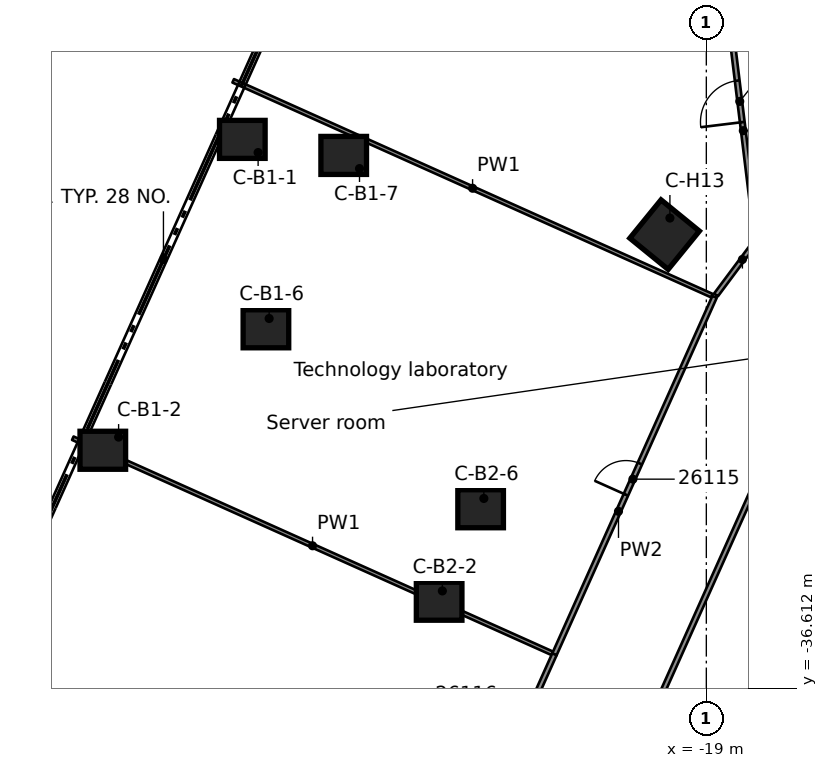
"""IFC4 building model, lengths in metres.
Left out: names, types, materials, properties, quantities, classifications, styles, units other than length and angle.
Written with IfcOpenShell. Run it as: python <this file> out.ifc"""

import sys

from ifc_helpers import new_model, si_unit, direction, frame, frame_2d, origin, origin_2d, place, context, subcontext, project, spatial, rectangle, extrude, element, fill, save


model = new_model("IFC4")
c1 = context("Model", 3, precision=1e-05, world=origin(), true_north=direction((0.0, 1.0)))
c2 = subcontext(c1, "Body", "Model", "MODEL_VIEW")
j1 = project(units=[si_unit("LENGTHUNIT", "METRE"), si_unit("PLANEANGLEUNIT", "RADIAN")], contexts=[c1])
p1 = place(None, origin())
s1 = spatial("IfcSite", under=j1, at=p1, CompositionType="ELEMENT")
p2 = place(p1, origin())
s2 = spatial("IfcBuilding", under=s1, at=p2, CompositionType="ELEMENT")
p3 = place(p2, frame((0.0, 0.0, 134.2)))
s3 = spatial("IfcBuildingStorey", under=s2, at=p3, CompositionType="ELEMENT", Elevation=134.2)
for number, where, z_axis, x_axis in (
    (1, (-31.21, -22.166, 0.0), (0.0, 0.0, 1.0), (1.0, 0.0, 0.0)),
    (2, (-34.881, -30.346, 0.0), (0.0, 0.0, 1.0), (1.0, 0.0, 0.0)),
    (3, (-30.589, -27.15, 0.0), (0.0, 0.0, 1.0), (1.0, 0.0, 0.0)),
    (4, (-28.542, -22.588, 0.0), (0.0, 0.0, 1.0), (1.0, 0.0, 0.0)),
    (5, (-26.031, -34.318, 0.0), (0.0, 0.0, 1.0), (1.0, 0.0, 0.0)),
    (6, (-24.939, -31.885, 0.0), (0.0, 0.0, 1.0), (1.0, 0.0, 0.0)),
):
    element("IfcColumn", number, at=place(p3, frame(where, z_axis=z_axis, x_axis=x_axis)), inside=s3, PredefinedType="COLUMN", context=c2, shape_type="SweptSolid", body=[
        extrude(rectangle(XDim=1.2, YDim=1.0, at=origin_2d()), origin(), (0.0, 0.0, 1.0), 3.5),
    ])
p4 = place(p3, frame((-20.098, -24.672, 0.0), z_axis=(0.0, 0.0, 1.0), x_axis=(-0.631582861875, -0.775308382894, 0.0)))
e7 = element("IfcColumn", 7, at=p4, inside=s3, PredefinedType="COLUMN", context=c2, shape_type="SweptSolid", body=[
    extrude(rectangle(XDim=1.3, YDim=1.3, at=origin_2d()), origin(), (0.0, 0.0, 1.0), 3.5),
])
p5 = place(p3, frame((-17.788, -23.891, 0.0), z_axis=(0.0, 0.0, 1.0), x_axis=(-0.121262962016, 0.992620417906, 0.0)))
e8 = element("IfcWall", 8, at=p5, inside=s3, PredefinedType="PARTITIONING", context=c2, shape_type="SweptSolid", body=[
    extrude(rectangle(XDim=4.923, YDim=0.125, at=frame_2d((2.461, 0.0))), origin(), (0.0, 0.0, 1.0), 3.03),
])
p6 = place(p5, frame((2.195, 0.0, 0.0)))
e9 = element("IfcOpeningElement", 9, at=p6, cuts=e8, PredefinedType="OPENING", context=c2, shape_type="SweptSolid", body=[
    extrude(rectangle(XDim=1.1, YDim=2.1, at=frame_2d((0.55, 1.05))), frame((0.0, 0.073, 0.0), z_axis=(0.0, -1.0, 0.0), x_axis=(1.0, 0.0, 0.0)), (0.0, 0.0, 1.0), 0.145),
])
p7 = place(p3, frame((-35.67, -30.029, 0.0), z_axis=(0.0, 0.0, 1.0), x_axis=(0.912388382828, -0.409325590307, 0.0)))
e10 = element("IfcWall", 10, at=p7, inside=s3, PredefinedType="PARTITIONING", context=c2, shape_type="SweptSolid", body=[
    extrude(rectangle(XDim=13.827, YDim=0.1, at=frame_2d((6.914, 0.0))), origin(), (0.0, 0.0, 1.0), 3.03),
])
p8 = place(p3, frame((-31.45, -20.625, 0.0), z_axis=(0.0, 0.0, 1.0), x_axis=(0.91235405171, -0.409402105916, 0.0)))
e11 = element("IfcWall", 11, at=p8, inside=s3, PredefinedType="PARTITIONING", context=c2, shape_type="SweptSolid", body=[
    extrude(rectangle(XDim=13.808, YDim=0.1, at=frame_2d((6.904, 0.0))), origin(), (0.0, 0.0, 1.0), 3.03),
])
p9 = place(p3, frame((-17.355, -24.392, 0.0), z_axis=(0.0, 0.0, 1.0), x_axis=(-0.597497187646, -0.801871006306, 0.0)))
e12 = element("IfcWall", 12, at=p9, inside=s3, PredefinedType="PARTITIONING", context=c2, shape_type="SweptSolid", body=[
    extrude(rectangle(XDim=2.328, YDim=0.125, at=frame_2d((1.164, 0.0))), origin(), (0.0, 0.0, 1.0), 3.03),
])
p10 = place(p3, frame((-18.846, -50.182, 0.0), z_axis=(0.0, 0.0, 1.0), x_axis=(0.409280065355, 0.912408805363, 0.0)))
e13 = element("IfcWall", 13, at=p10, inside=s3, PredefinedType="PARTITIONING", context=c2, shape_type="SweptSolid", body=[
    extrude(rectangle(XDim=21.42, YDim=0.125, at=frame_2d((10.71, 0.0))), origin(), (0.0, 0.0, 1.0), 3.03),
])
p11 = place(p10, frame((16.1, 0.0, 0.0)))
e14 = element("IfcOpeningElement", 14, at=p11, cuts=e13, PredefinedType="OPENING", context=c2, shape_type="SweptSolid", body=[
    extrude(rectangle(XDim=0.9, YDim=2.1, at=frame_2d((0.45, 1.05))), frame((0.0, 0.073, 0.0), z_axis=(0.0, -1.0, 0.0), x_axis=(1.0, 0.0, 0.0)), (0.0, 0.0, 1.0), 0.145),
])
p12 = place(p10, frame((6.7, 0.0, 0.0)))
e15 = element("IfcOpeningElement", 15, at=p12, cuts=e13, PredefinedType="OPENING", context=c2, shape_type="SweptSolid", body=[
    extrude(rectangle(XDim=0.9, YDim=2.1, at=frame_2d((0.45, 1.05))), frame((0.0, 0.073, 0.0), z_axis=(0.0, -1.0, 0.0), x_axis=(1.0, 0.0, 0.0)), (0.0, 0.0, 1.0), 0.145),
])
p13 = place(p3, frame((-16.045, -27.538, 0.0), z_axis=(0.0, 0.0, 1.0), x_axis=(-0.408825080593, -0.912612762062, 0.0)))
e16 = element("IfcWall", 16, at=p13, inside=s3, PredefinedType="PARTITIONING", context=c2, shape_type="SweptSolid", body=[
    extrude(rectangle(XDim=21.806, YDim=0.125, at=frame_2d((10.903, 0.0))), origin(), (0.0, 0.0, 1.0), 3.03),
])
p14 = place(p13, frame((20.056, 0.0, 0.0)))
e17 = element("IfcOpeningElement", 17, at=p14, cuts=e16, PredefinedType="OPENING", context=c2, shape_type="SweptSolid", body=[
    extrude(rectangle(XDim=0.9, YDim=2.1, at=frame_2d((0.45, 1.05))), frame((0.0, 0.073, 0.0), z_axis=(0.0, -1.0, 0.0), x_axis=(1.0, 0.0, 0.0)), (0.0, 0.0, 1.0), 0.145),
])
p15 = place(p3, frame((-22.997, -35.715, 0.0), z_axis=(0.0, 0.0, 1.0), x_axis=(0.408864099405, 0.91259528172, 0.0)))
e18 = element("IfcWall", 18, at=p15, inside=s3, PredefinedType="PARTITIONING", context=c2, shape_type="SweptSolid", body=[
    extrude(rectangle(XDim=10.307, YDim=0.125, at=frame_2d((5.153, 0.0))), origin(), (0.0, 0.0, 1.0), 3.03),
])
p16 = place(p15, frame((4.6, 0.0, 0.0)))
e19 = element("IfcOpeningElement", 19, at=p16, cuts=e18, PredefinedType="OPENING", context=c2, shape_type="SweptSolid", body=[
    extrude(rectangle(XDim=0.9, YDim=2.1, at=frame_2d((0.45, 1.05))), frame((0.0, 0.073, 0.0), z_axis=(0.0, -1.0, 0.0), x_axis=(1.0, 0.0, 0.0)), (0.0, 0.0, 1.0), 0.145),
])
p17 = place(p3, frame((-26.635, -43.838, 0.0), z_axis=(0.0, 0.0, 1.0), x_axis=(0.40874555993, 0.912648380943, 0.0)))
e20 = element("IfcWall", 20, at=p17, inside=s3, PredefinedType="PARTITIONING", context=c2, shape_type="SweptSolid", body=[
    extrude(rectangle(XDim=8.9, YDim=0.125, at=frame_2d((4.45, 0.0))), origin(), (0.0, 0.0, 1.0), 3.03),
])
p18 = place(p17, frame((3.6, 0.0, 0.0)))
e21 = element("IfcOpeningElement", 21, at=p18, cuts=e20, PredefinedType="OPENING", context=c2, shape_type="SweptSolid", body=[
    extrude(rectangle(XDim=1.8, YDim=2.1, at=frame_2d((0.9, 1.05))), frame((0.0, 0.073, 0.0), z_axis=(0.0, -1.0, 0.0), x_axis=(1.0, 0.0, 0.0)), (0.0, 0.0, 1.0), 0.145),
])
p19 = place(p16, origin())
e22 = element("IfcDoor", 22, at=p19, inside=s3, OperationType="SINGLE_SWING_LEFT", PredefinedType="DOOR", context=c2, shape_type="SweptSolid", body=[
    extrude(rectangle(XDim=0.9, YDim=2.1, at=frame_2d((0.45, 1.05))), frame((0.0, 0.025, 0.0), z_axis=(0.0, -1.0, 0.0), x_axis=(1.0, 0.0, 0.0)), (0.0, 0.0, 1.0), 0.05),
])
fill(e19, e22)
p20 = place(p6, origin())
e23 = element("IfcDoor", 23, at=p20, inside=s3, OperationType="SINGLE_SWING_RIGHT", PredefinedType="DOOR", context=c2, shape_type="SweptSolid", body=[
    extrude(rectangle(XDim=1.1, YDim=2.1, at=frame_2d((0.55, 1.05))), frame((0.0, 0.025, 0.0), z_axis=(0.0, -1.0, 0.0), x_axis=(1.0, 0.0, 0.0)), (0.0, 0.0, 1.0), 0.05),
])
fill(e9, e23)
save(model, sys.argv[1])
